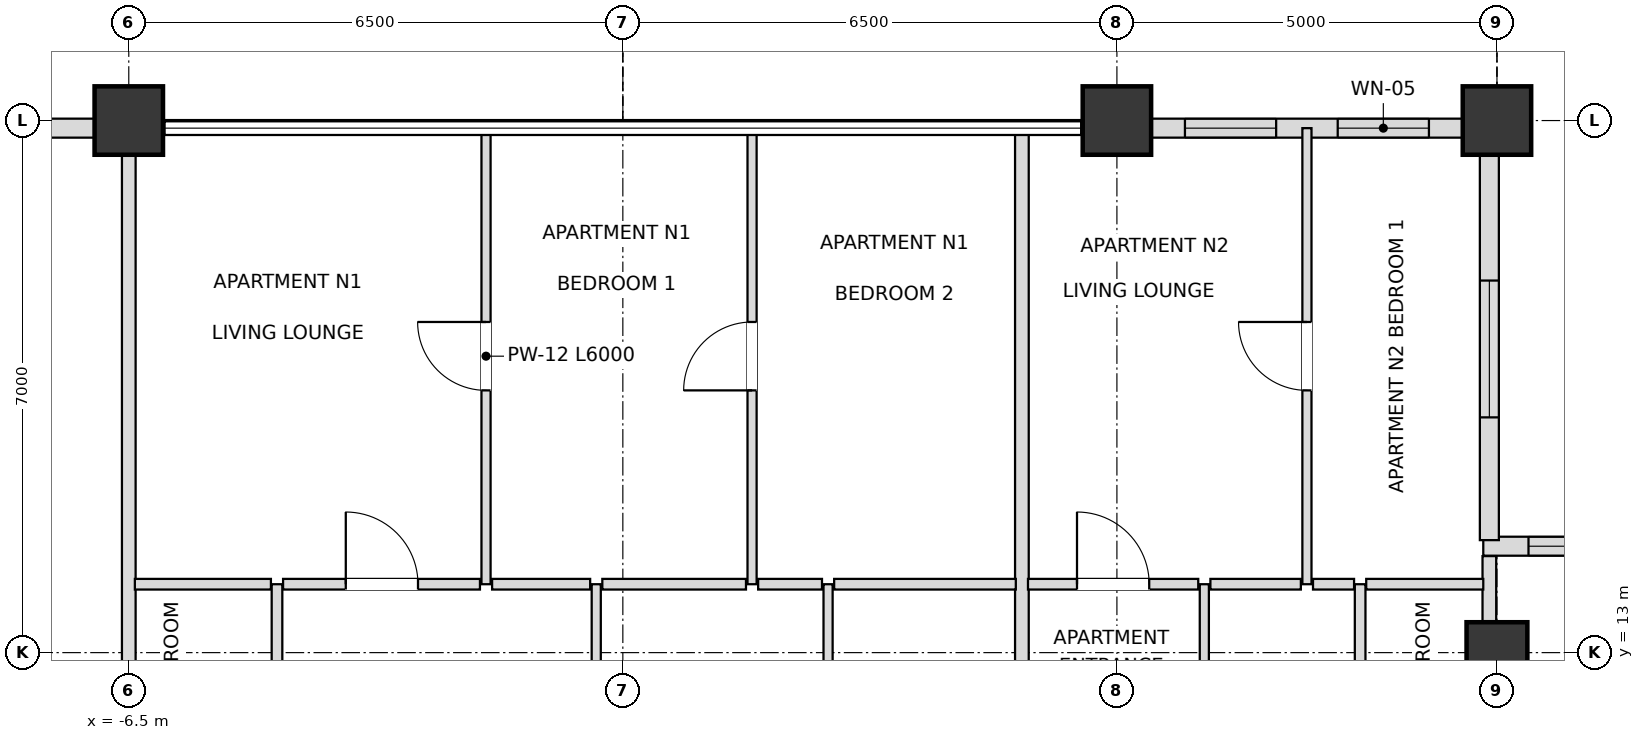
"""IFC4 building model, lengths in metres.
Left out: names, types, materials, properties, quantities, classifications, styles, units other than length and angle.
Written with IfcOpenShell. Run it as: python <this file> out.ifc"""

import sys

from ifc_helpers import new_model, si_unit, direction, frame, frame_2d, origin, origin_2d, place, context, subcontext, project, spatial, rectangle, extrude, element, fill, save


model = new_model("IFC4")
c1 = context("Model", 3, precision=1e-05, world=origin(), true_north=direction((0.0, 1.0)))
c2 = subcontext(c1, "Body", "Model", "MODEL_VIEW")
j1 = project(units=[si_unit("LENGTHUNIT", "METRE"), si_unit("PLANEANGLEUNIT", "RADIAN")], contexts=[c1])
p1 = place(None, origin())
s1 = spatial("IfcSite", under=j1, at=p1, CompositionType="ELEMENT")
p2 = place(p1, origin())
s2 = spatial("IfcBuilding", under=s1, at=p2, CompositionType="ELEMENT")
p3 = place(p2, frame((0.0, 0.0, 229.5)))
s3 = spatial("IfcBuildingStorey", under=s2, at=p3, CompositionType="ELEMENT", Elevation=229.5)
for number, where, z_axis, x_axis in (
    (1, (11.5, 20.0, 0.0), (0.0, 0.0, 1.0), (1.0, 0.0, 0.0)),
    (2, (6.5, 20.0, 0.0), (0.0, 0.0, 1.0), (1.0, 0.0, 0.0)),
    (3, (-6.5, 20.0, 0.0), (0.0, 0.0, 1.0), (1.0, 0.0, 0.0)),
):
    element("IfcColumn", number, at=place(p3, frame(where, z_axis=z_axis, x_axis=x_axis)), inside=s3, PredefinedType="USERDEFINED", context=c2, shape_type="SweptSolid", body=[
        extrude(rectangle(XDim=0.9, YDim=0.9, at=origin_2d()), origin(), (0.0, 0.0, 1.0), 3.6),
    ])
p4 = place(p3, frame((11.5, 13.0, 0.0), z_axis=(0.0, 0.0, 1.0), x_axis=(1.0, 0.0, 0.0)))
e4 = element("IfcColumn", 4, at=p4, inside=s3, PredefinedType="COLUMN", context=c2, shape_type="SweptSolid", body=[
    extrude(rectangle(XDim=0.8, YDim=0.8, at=origin_2d()), origin(), (0.0, 0.0, 1.0), 3.6),
])
p5 = place(p3, frame((11.055, 19.9, 0.0), z_axis=(0.0, 0.0, 1.0), x_axis=(-1.0, 0.0, 0.0)))
e5 = element("IfcWall", 5, at=p5, inside=s3, PredefinedType="SOLIDWALL", context=c2, shape_type="SweptSolid", body=[
    extrude(rectangle(XDim=4.11, YDim=0.25, at=frame_2d((2.055, 0.0))), origin(), (0.0, 0.0, 1.0), 2.748),
])
p6 = place(p5, frame((0.45, 0.0, 0.72)))
e6 = element("IfcOpeningElement", 6, at=p6, cuts=e5, PredefinedType="OPENING", context=c2, shape_type="SweptSolid", body=[
    extrude(rectangle(XDim=1.2, YDim=1.68, at=frame_2d((0.6, 0.84))), frame((0.0, 0.135, 0.0), z_axis=(0.0, -1.0, 0.0), x_axis=(1.0, 0.0, 0.0)), (0.0, 0.0, 1.0), 0.27),
])
p7 = place(p5, frame((2.46, 0.0, 0.72)))
e7 = element("IfcOpeningElement", 7, at=p7, cuts=e5, PredefinedType="OPENING", context=c2, shape_type="SweptSolid", body=[
    extrude(rectangle(XDim=1.2, YDim=1.68, at=frame_2d((0.6, 0.84))), frame((0.0, 0.135, 0.0), z_axis=(0.0, -1.0, 0.0), x_axis=(1.0, 0.0, 0.0)), (0.0, 0.0, 1.0), 0.27),
])
p8 = place(p3, frame((-6.945, 19.9, 0.0), z_axis=(0.0, 0.0, 1.0), x_axis=(-1.0, 0.0, 0.0)))
e8 = element("IfcWall", 8, at=p8, inside=s3, PredefinedType="SOLIDWALL", context=c2, shape_type="SweptSolid", body=[
    extrude(rectangle(XDim=4.11, YDim=0.25, at=frame_2d((2.055, 0.0))), origin(), (0.0, 0.0, 1.0), 2.748),
])
p9 = place(p8, frame((1.155, 0.0, 0.72)))
e9 = element("IfcOpeningElement", 9, at=p9, cuts=e8, PredefinedType="OPENING", context=c2, shape_type="SweptSolid", body=[
    extrude(rectangle(XDim=1.8, YDim=1.68, at=frame_2d((0.9, 0.84))), frame((0.0, 0.135, 0.0), z_axis=(0.0, -1.0, 0.0), x_axis=(1.0, 0.0, 0.0)), (0.0, 0.0, 1.0), 0.27),
])
p10 = place(p3, frame((16.98, 14.4, 0.0), z_axis=(0.0, 0.0, 1.0), x_axis=(-1.0, 0.0, 0.0)))
e10 = element("IfcWall", 10, at=p10, inside=s3, PredefinedType="SOLIDWALL", context=c2, shape_type="SweptSolid", body=[
    extrude(rectangle(XDim=5.66, YDim=0.25, at=frame_2d((2.83, 0.0))), origin(), (0.0, 0.0, 1.0), 2.748),
])
p11 = place(p10, frame((0.595, 0.0, 0.72)))
e11 = element("IfcOpeningElement", 11, at=p11, cuts=e10, PredefinedType="OPENING", context=c2, shape_type="SweptSolid", body=[
    extrude(rectangle(XDim=1.8, YDim=1.68, at=frame_2d((0.9, 0.84))), frame((0.0, 0.135, 0.0), z_axis=(0.0, -1.0, 0.0), x_axis=(1.0, 0.0, 0.0)), (0.0, 0.0, 1.0), 0.27),
])
p12 = place(p10, frame((3.265, 0.0, 0.72)))
e12 = element("IfcOpeningElement", 12, at=p12, cuts=e10, PredefinedType="OPENING", context=c2, shape_type="SweptSolid", body=[
    extrude(rectangle(XDim=1.8, YDim=1.68, at=frame_2d((0.9, 0.84))), frame((0.0, 0.135, 0.0), z_axis=(0.0, -1.0, 0.0), x_axis=(1.0, 0.0, 0.0)), (0.0, 0.0, 1.0), 0.27),
])
p13 = place(p3, frame((11.4, 14.48, 0.0), z_axis=(0.0, 0.0, 1.0), x_axis=(0.0, 1.0, 0.0)))
e13 = element("IfcWall", 13, at=p13, inside=s3, PredefinedType="SOLIDWALL", context=c2, shape_type="SweptSolid", body=[
    extrude(rectangle(XDim=5.34, YDim=0.25, at=frame_2d((2.67, 0.0))), origin(), (0.0, 0.0, 1.0), 2.748),
])
p14 = place(p13, frame((1.615, 0.0, 0.72)))
e14 = element("IfcOpeningElement", 14, at=p14, cuts=e13, PredefinedType="OPENING", context=c2, shape_type="SweptSolid", body=[
    extrude(rectangle(XDim=1.8, YDim=1.68, at=frame_2d((0.9, 0.84))), frame((0.0, 0.135, 0.0), z_axis=(0.0, -1.0, 0.0), x_axis=(1.0, 0.0, 0.0)), (0.0, 0.0, 1.0), 0.27),
])
p15 = place(p3, frame((-6.5, 9.2, 0.0), z_axis=(0.0, 0.0, 1.0), x_axis=(0.0, 1.0, 0.0)))
e15 = element("IfcWall", 15, at=p15, inside=s3, PredefinedType="PARTITIONING", context=c2, shape_type="SweptSolid", body=[
    extrude(rectangle(XDim=10.7, YDim=0.18, at=frame_2d((5.35, 0.0))), origin(), (0.0, 0.0, 1.0), 2.826),
])
p16 = place(p3, frame((-4.55, 9.2, 0.0), z_axis=(0.0, 0.0, 1.0), x_axis=(0.0, 1.0, 0.0)))
e16 = element("IfcWall", 16, at=p16, inside=s3, PredefinedType="PARTITIONING", context=c2, shape_type="SweptSolid", body=[
    extrude(rectangle(XDim=4.7, YDim=0.14, at=frame_2d((2.35, 0.0))), origin(), (0.0, 0.0, 1.0), 3.38),
])
p17 = place(p16, frame((1.9, 0.0, 0.0)))
e17 = element("IfcOpeningElement", 17, at=p17, cuts=e16, PredefinedType="OPENING", context=c2, shape_type="SweptSolid", body=[
    extrude(rectangle(XDim=0.9, YDim=2.1, at=frame_2d((0.45, 1.05))), frame((0.0, 0.08, 0.0), z_axis=(0.0, -1.0, 0.0), x_axis=(1.0, 0.0, 0.0)), (0.0, 0.0, 1.0), 0.16),
])
p18 = place(p3, frame((-1.8, 13.9, 0.0), z_axis=(0.0, 0.0, 1.0), x_axis=(0.0, 1.0, 0.0)))
e18 = element("IfcWall", 18, at=p18, inside=s3, PredefinedType="PARTITIONING", context=c2, shape_type="SweptSolid", body=[
    extrude(rectangle(XDim=6.0, YDim=0.12, at=frame_2d((3.0, 0.0))), origin(), (0.0, 0.0, 1.0), 3.018),
])
p19 = place(p18, frame((2.55, 0.0, 0.0)))
e19 = element("IfcOpeningElement", 19, at=p19, cuts=e18, PredefinedType="OPENING", context=c2, shape_type="SweptSolid", body=[
    extrude(rectangle(XDim=0.9, YDim=2.1, at=frame_2d((0.45, 1.05))), frame((0.0, 0.07, 0.0), z_axis=(0.0, -1.0, 0.0), x_axis=(1.0, 0.0, 0.0)), (0.0, 0.0, 1.0), 0.14),
])
p20 = place(p3, frame((-0.35, 9.2, 0.0), z_axis=(0.0, 0.0, 1.0), x_axis=(0.0, 1.0, 0.0)))
e20 = element("IfcWall", 20, at=p20, inside=s3, PredefinedType="PARTITIONING", context=c2, shape_type="SweptSolid", body=[
    extrude(rectangle(XDim=4.7, YDim=0.12, at=frame_2d((2.35, 0.0))), origin(), (0.0, 0.0, 1.0), 3.38),
])
p21 = place(p20, frame((1.875, 0.0, 0.0)))
e21 = element("IfcOpeningElement", 21, at=p21, cuts=e20, PredefinedType="OPENING", context=c2, shape_type="SweptSolid", body=[
    extrude(rectangle(XDim=0.95, YDim=2.1, at=frame_2d((0.475, 1.05))), frame((0.0, 0.07, 0.0), z_axis=(0.0, -1.0, 0.0), x_axis=(1.0, 0.0, 0.0)), (0.0, 0.0, 1.0), 0.14),
])
p22 = place(p3, frame((1.7, 13.9, 0.0), z_axis=(0.0, 0.0, 1.0), x_axis=(0.0, 1.0, 0.0)))
e22 = element("IfcWall", 22, at=p22, inside=s3, PredefinedType="PARTITIONING", context=c2, shape_type="SweptSolid", body=[
    extrude(rectangle(XDim=6.0, YDim=0.12, at=frame_2d((3.0, 0.0))), origin(), (0.0, 0.0, 1.0), 3.018),
])
p23 = place(p22, frame((2.55, 0.0, 0.0)))
e23 = element("IfcOpeningElement", 23, at=p23, cuts=e22, PredefinedType="OPENING", context=c2, shape_type="SweptSolid", body=[
    extrude(rectangle(XDim=0.9, YDim=2.1, at=frame_2d((0.45, 1.05))), frame((0.0, 0.07, 0.0), z_axis=(0.0, -1.0, 0.0), x_axis=(1.0, 0.0, 0.0)), (0.0, 0.0, 1.0), 0.14),
])
p24 = place(p3, frame((2.7, 9.2, 0.0), z_axis=(0.0, 0.0, 1.0), x_axis=(0.0, 1.0, 0.0)))
e24 = element("IfcWall", 24, at=p24, inside=s3, PredefinedType="PARTITIONING", context=c2, shape_type="SweptSolid", body=[
    extrude(rectangle(XDim=4.7, YDim=0.12, at=frame_2d((2.35, 0.0))), origin(), (0.0, 0.0, 1.0), 3.38),
])
p25 = place(p24, frame((1.9, 0.0, 0.0)))
e25 = element("IfcOpeningElement", 25, at=p25, cuts=e24, PredefinedType="OPENING", context=c2, shape_type="SweptSolid", body=[
    extrude(rectangle(XDim=0.9, YDim=2.1, at=frame_2d((0.45, 1.05))), frame((0.0, 0.07, 0.0), z_axis=(0.0, -1.0, 0.0), x_axis=(1.0, 0.0, 0.0)), (0.0, 0.0, 1.0), 0.14),
])
p26 = place(p3, frame((5.25, 9.2, 0.0), z_axis=(0.0, 0.0, 1.0), x_axis=(0.0, 1.0, 0.0)))
e26 = element("IfcWall", 26, at=p26, inside=s3, PredefinedType="PARTITIONING", context=c2, shape_type="SweptSolid", body=[
    extrude(rectangle(XDim=10.7, YDim=0.18, at=frame_2d((5.35, 0.0))), origin(), (0.0, 0.0, 1.0), 3.018),
])
p27 = place(p3, frame((7.65, 9.2, 0.0), z_axis=(0.0, 0.0, 1.0), x_axis=(0.0, 1.0, 0.0)))
e27 = element("IfcWall", 27, at=p27, inside=s3, PredefinedType="PARTITIONING", context=c2, shape_type="SweptSolid", body=[
    extrude(rectangle(XDim=4.7, YDim=0.12, at=frame_2d((2.35, 0.0))), origin(), (0.0, 0.0, 1.0), 2.826),
])
p28 = place(p27, frame((1.875, 0.0, 0.0)))
e28 = element("IfcOpeningElement", 28, at=p28, cuts=e27, PredefinedType="OPENING", context=c2, shape_type="SweptSolid", body=[
    extrude(rectangle(XDim=0.95, YDim=2.1, at=frame_2d((0.475, 1.05))), frame((0.0, 0.07, 0.0), z_axis=(0.0, -1.0, 0.0), x_axis=(1.0, 0.0, 0.0)), (0.0, 0.0, 1.0), 0.14),
])
p29 = place(p3, frame((9.0, 13.9, 0.0), z_axis=(0.0, 0.0, 1.0), x_axis=(0.0, 1.0, 0.0)))
e29 = element("IfcWall", 29, at=p29, inside=s3, PredefinedType="PARTITIONING", context=c2, shape_type="SweptSolid", body=[
    extrude(rectangle(XDim=6.0, YDim=0.12, at=frame_2d((3.0, 0.0))), origin(), (0.0, 0.0, 1.0), 3.38),
])
p30 = place(p29, frame((2.55, 0.0, 0.0)))
e30 = element("IfcOpeningElement", 30, at=p30, cuts=e29, PredefinedType="OPENING", context=c2, shape_type="SweptSolid", body=[
    extrude(rectangle(XDim=0.9, YDim=2.1, at=frame_2d((0.45, 1.05))), frame((0.0, 0.07, 0.0), z_axis=(0.0, -1.0, 0.0), x_axis=(1.0, 0.0, 0.0)), (0.0, 0.0, 1.0), 0.14),
])
p31 = place(p3, frame((9.7, 9.2, 0.0), z_axis=(0.0, 0.0, 1.0), x_axis=(0.0, 1.0, 0.0)))
e31 = element("IfcWall", 31, at=p31, inside=s3, PredefinedType="PARTITIONING", context=c2, shape_type="SweptSolid", body=[
    extrude(rectangle(XDim=4.7, YDim=0.14, at=frame_2d((2.35, 0.0))), origin(), (0.0, 0.0, 1.0), 2.826),
])
p32 = place(p31, frame((1.9, 0.0, 0.0)))
e32 = element("IfcOpeningElement", 32, at=p32, cuts=e31, PredefinedType="OPENING", context=c2, shape_type="SweptSolid", body=[
    extrude(rectangle(XDim=0.9, YDim=2.1, at=frame_2d((0.45, 1.05))), frame((0.0, 0.08, 0.0), z_axis=(0.0, -1.0, 0.0), x_axis=(1.0, 0.0, 0.0)), (0.0, 0.0, 1.0), 0.16),
])
p33 = place(p3, frame((11.4, 9.2, 0.0), z_axis=(0.0, 0.0, 1.0), x_axis=(0.0, 1.0, 0.0)))
e33 = element("IfcWall", 33, at=p33, inside=s3, PredefinedType="PARTITIONING", context=c2, shape_type="SweptSolid", body=[
    extrude(rectangle(XDim=5.07, YDim=0.18, at=frame_2d((2.535, 0.0))), origin(), (0.0, 0.0, 1.0), 2.748),
])
p34 = place(p3, frame((-6.42, 13.9, 0.0), z_axis=(0.0, 0.0, 1.0), x_axis=(1.0, 0.0, 0.0)))
e34 = element("IfcWall", 34, at=p34, inside=s3, PredefinedType="PARTITIONING", context=c2, shape_type="SweptSolid", body=[
    extrude(rectangle(XDim=1.79, YDim=0.14, at=frame_2d((0.895, 0.0))), origin(), (0.0, 0.0, 1.0), 3.38),
])
p35 = place(p3, frame((-4.47, 13.9, 0.0), z_axis=(0.0, 0.0, 1.0), x_axis=(1.0, 0.0, 0.0)))
e35 = element("IfcWall", 35, at=p35, inside=s3, PredefinedType="PARTITIONING", context=c2, shape_type="SweptSolid", body=[
    extrude(rectangle(XDim=2.59, YDim=0.14, at=frame_2d((1.295, 0.0))), origin(), (0.0, 0.0, 1.0), 3.38),
])
p36 = place(p35, frame((0.825, 0.0, 0.0)))
e36 = element("IfcOpeningElement", 36, at=p36, cuts=e35, PredefinedType="OPENING", context=c2, shape_type="SweptSolid", body=[
    extrude(rectangle(XDim=0.95, YDim=2.1, at=frame_2d((0.475, 1.05))), frame((0.0, 0.08, 0.0), z_axis=(0.0, -1.0, 0.0), x_axis=(1.0, 0.0, 0.0)), (0.0, 0.0, 1.0), 0.16),
])
p37 = place(p3, frame((-1.72, 13.9, 0.0), z_axis=(0.0, 0.0, 1.0), x_axis=(1.0, 0.0, 0.0)))
e37 = element("IfcWall", 37, at=p37, inside=s3, PredefinedType="PARTITIONING", context=c2, shape_type="SweptSolid", body=[
    extrude(rectangle(XDim=1.29, YDim=0.14, at=frame_2d((0.645, 0.0))), origin(), (0.0, 0.0, 1.0), 3.38),
])
p38 = place(p3, frame((-0.27, 13.9, 0.0), z_axis=(0.0, 0.0, 1.0), x_axis=(1.0, 0.0, 0.0)))
e38 = element("IfcWall", 38, at=p38, inside=s3, PredefinedType="PARTITIONING", context=c2, shape_type="SweptSolid", body=[
    extrude(rectangle(XDim=1.89, YDim=0.14, at=frame_2d((0.945, 0.0))), origin(), (0.0, 0.0, 1.0), 3.38),
])
p39 = place(p3, frame((1.78, 13.9, 0.0), z_axis=(0.0, 0.0, 1.0), x_axis=(1.0, 0.0, 0.0)))
e39 = element("IfcWall", 39, at=p39, inside=s3, PredefinedType="PARTITIONING", context=c2, shape_type="SweptSolid", body=[
    extrude(rectangle(XDim=0.84, YDim=0.14, at=frame_2d((0.42, 0.0))), origin(), (0.0, 0.0, 1.0), 3.38),
])
p40 = place(p3, frame((2.78, 13.9, 0.0), z_axis=(0.0, 0.0, 1.0), x_axis=(1.0, 0.0, 0.0)))
e40 = element("IfcWall", 40, at=p40, inside=s3, PredefinedType="PARTITIONING", context=c2, shape_type="SweptSolid", body=[
    extrude(rectangle(XDim=2.39, YDim=0.14, at=frame_2d((1.195, 0.0))), origin(), (0.0, 0.0, 1.0), 3.38),
])
p41 = place(p3, frame((5.33, 13.9, 0.0), z_axis=(0.0, 0.0, 1.0), x_axis=(1.0, 0.0, 0.0)))
e41 = element("IfcWall", 41, at=p41, inside=s3, PredefinedType="PARTITIONING", context=c2, shape_type="SweptSolid", body=[
    extrude(rectangle(XDim=2.24, YDim=0.14, at=frame_2d((1.12, 0.0))), origin(), (0.0, 0.0, 1.0), 2.826),
])
p42 = place(p41, frame((0.645, 0.0, 0.0)))
e42 = element("IfcOpeningElement", 42, at=p42, cuts=e41, PredefinedType="OPENING", context=c2, shape_type="SweptSolid", body=[
    extrude(rectangle(XDim=0.95, YDim=2.1, at=frame_2d((0.475, 1.05))), frame((0.0, 0.08, 0.0), z_axis=(0.0, -1.0, 0.0), x_axis=(1.0, 0.0, 0.0)), (0.0, 0.0, 1.0), 0.16),
])
p43 = place(p3, frame((7.73, 13.9, 0.0), z_axis=(0.0, 0.0, 1.0), x_axis=(1.0, 0.0, 0.0)))
e43 = element("IfcWall", 43, at=p43, inside=s3, PredefinedType="PARTITIONING", context=c2, shape_type="SweptSolid", body=[
    extrude(rectangle(XDim=1.19, YDim=0.14, at=frame_2d((0.595, 0.0))), origin(), (0.0, 0.0, 1.0), 3.38),
])
p44 = place(p3, frame((9.08, 13.9, 0.0), z_axis=(0.0, 0.0, 1.0), x_axis=(1.0, 0.0, 0.0)))
e44 = element("IfcWall", 44, at=p44, inside=s3, PredefinedType="PARTITIONING", context=c2, shape_type="SweptSolid", body=[
    extrude(rectangle(XDim=0.54, YDim=0.14, at=frame_2d((0.27, 0.0))), origin(), (0.0, 0.0, 1.0), 3.38),
])
p45 = place(p3, frame((9.78, 13.9, 0.0), z_axis=(0.0, 0.0, 1.0), x_axis=(1.0, 0.0, 0.0)))
e45 = element("IfcWall", 45, at=p45, inside=s3, PredefinedType="PARTITIONING", context=c2, shape_type="SweptSolid", body=[
    extrude(rectangle(XDim=1.54, YDim=0.14, at=frame_2d((0.77, 0.0))), origin(), (0.0, 0.0, 1.0), 3.38),
])
p46 = place(p6, origin())
e46 = element("IfcWindow", 46, at=p46, inside=s3, PartitioningType="SINGLE_PANEL", PredefinedType="WINDOW", context=c2, shape_type="SweptSolid", body=[
    extrude(rectangle(XDim=1.2, YDim=1.68, at=frame_2d((0.6, 0.84))), frame((0.0, 0.03, 0.0), z_axis=(0.0, -1.0, 0.0), x_axis=(1.0, 0.0, 0.0)), (0.0, 0.0, 1.0), 0.06),
])
fill(e6, e46)
p47 = place(p7, origin())
e47 = element("IfcWindow", 47, at=p47, inside=s3, PartitioningType="SINGLE_PANEL", PredefinedType="WINDOW", context=c2, shape_type="SweptSolid", body=[
    extrude(rectangle(XDim=1.2, YDim=1.68, at=frame_2d((0.6, 0.84))), frame((0.0, 0.03, 0.0), z_axis=(0.0, -1.0, 0.0), x_axis=(1.0, 0.0, 0.0)), (0.0, 0.0, 1.0), 0.06),
])
fill(e7, e47)
p48 = place(p12, origin())
e48 = element("IfcWindow", 48, at=p48, inside=s3, PartitioningType="SINGLE_PANEL", PredefinedType="WINDOW", context=c2, shape_type="SweptSolid", body=[
    extrude(rectangle(XDim=1.8, YDim=1.68, at=frame_2d((0.9, 0.84))), frame((0.0, 0.03, 0.0), z_axis=(0.0, -1.0, 0.0), x_axis=(1.0, 0.0, 0.0)), (0.0, 0.0, 1.0), 0.06),
])
fill(e12, e48)
p49 = place(p14, origin())
e49 = element("IfcWindow", 49, at=p49, inside=s3, PartitioningType="SINGLE_PANEL", PredefinedType="WINDOW", context=c2, shape_type="SweptSolid", body=[
    extrude(rectangle(XDim=1.8, YDim=1.68, at=frame_2d((0.9, 0.84))), frame((0.0, 0.03, 0.0), z_axis=(0.0, -1.0, 0.0), x_axis=(1.0, 0.0, 0.0)), (0.0, 0.0, 1.0), 0.06),
])
fill(e14, e49)
p50 = place(p36, origin())
e50 = element("IfcDoor", 50, at=p50, inside=s3, OperationType="SINGLE_SWING_LEFT", PredefinedType="DOOR", context=c2, shape_type="SweptSolid", body=[
    extrude(rectangle(XDim=0.95, YDim=2.1, at=frame_2d((0.475, 1.05))), frame((0.0, 0.025, 0.0), z_axis=(0.0, -1.0, 0.0), x_axis=(1.0, 0.0, 0.0)), (0.0, 0.0, 1.0), 0.05),
])
fill(e36, e50)
p51 = place(p19, origin())
e51 = element("IfcDoor", 51, at=p51, inside=s3, OperationType="SINGLE_SWING_RIGHT", PredefinedType="DOOR", context=c2, shape_type="SweptSolid", body=[
    extrude(rectangle(XDim=0.9, YDim=2.1, at=frame_2d((0.45, 1.05))), frame((0.0, 0.025, 0.0), z_axis=(0.0, -1.0, 0.0), x_axis=(1.0, 0.0, 0.0)), (0.0, 0.0, 1.0), 0.05),
])
fill(e19, e51)
p52 = place(p23, origin())
e52 = element("IfcDoor", 52, at=p52, inside=s3, OperationType="SINGLE_SWING_LEFT", PredefinedType="DOOR", context=c2, shape_type="SweptSolid", body=[
    extrude(rectangle(XDim=0.9, YDim=2.1, at=frame_2d((0.45, 1.05))), frame((0.0, 0.025, 0.0), z_axis=(0.0, -1.0, 0.0), x_axis=(1.0, 0.0, 0.0)), (0.0, 0.0, 1.0), 0.05),
])
fill(e23, e52)
p53 = place(p42, origin())
e53 = element("IfcDoor", 53, at=p53, inside=s3, OperationType="SINGLE_SWING_LEFT", PredefinedType="DOOR", context=c2, shape_type="SweptSolid", body=[
    extrude(rectangle(XDim=0.95, YDim=2.1, at=frame_2d((0.475, 1.05))), frame((0.0, 0.025, 0.0), z_axis=(0.0, -1.0, 0.0), x_axis=(1.0, 0.0, 0.0)), (0.0, 0.0, 1.0), 0.05),
])
fill(e42, e53)
p54 = place(p30, origin())
e54 = element("IfcDoor", 54, at=p54, inside=s3, OperationType="SINGLE_SWING_RIGHT", PredefinedType="DOOR", context=c2, shape_type="SweptSolid", body=[
    extrude(rectangle(XDim=0.9, YDim=2.1, at=frame_2d((0.45, 1.05))), frame((0.0, 0.025, 0.0), z_axis=(0.0, -1.0, 0.0), x_axis=(1.0, 0.0, 0.0)), (0.0, 0.0, 1.0), 0.05),
])
fill(e30, e54)
save(model, sys.argv[1])
